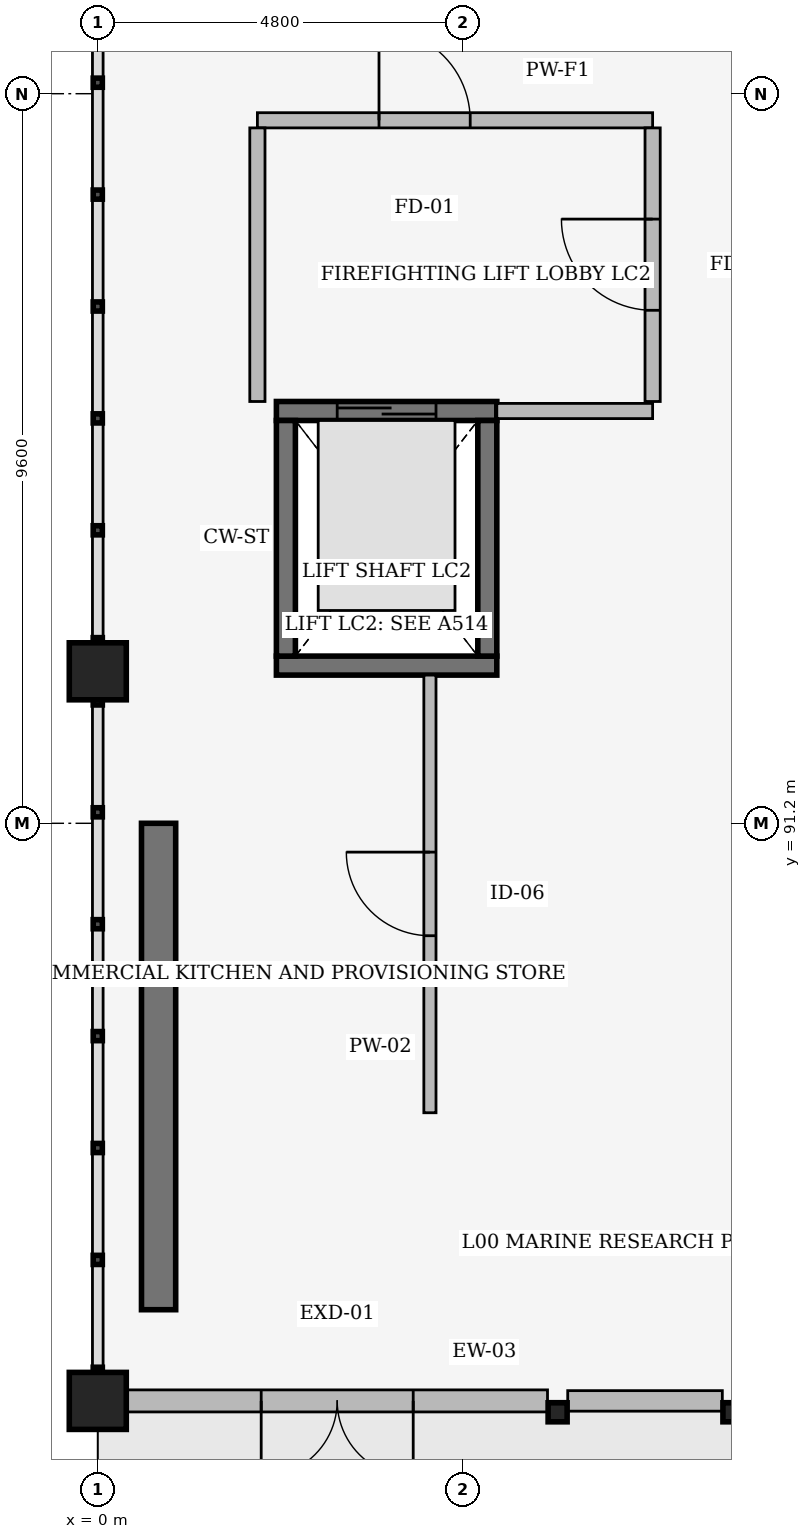
"""IFC4 building model, lengths in metres.
Left out: names, types, materials, properties, quantities, classifications, styles, units other than length and angle.
Written with IfcOpenShell. Run it as: python <this file> out.ifc"""

import sys

from ifc_helpers import new_model, si_unit, direction, frame, frame_2d, origin, origin_2d, place, context, subcontext, project, spatial, rectangle, hollow_rectangle, extrude, element, fill, save


model = new_model("IFC4")
c1 = context("Model", 3, precision=1e-05, world=origin(), true_north=direction((0.0, 1.0)))
c2 = subcontext(c1, "Body", "Model", "MODEL_VIEW")
j1 = project(units=[si_unit("LENGTHUNIT", "METRE"), si_unit("PLANEANGLEUNIT", "RADIAN")], contexts=[c1])
p1 = place(None, origin())
s1 = spatial("IfcSite", under=j1, at=p1, CompositionType="ELEMENT")
p2 = place(p1, origin())
s2 = spatial("IfcBuilding", under=s1, at=p2, CompositionType="ELEMENT")
p3 = place(p2, origin())
s3 = spatial("IfcBuildingStorey", under=s2, at=p3, CompositionType="ELEMENT", Elevation=0.0)
for number, where, z_axis, x_axis in (
    (1, (0.0, 83.6, 0.0), (0.0, 0.0, 1.0), (1.0, 0.0, 0.0)),
    (2, (0.0, 93.2, 0.0), (0.0, 0.0, 1.0), (1.0, 0.0, 0.0)),
):
    element("IfcColumn", number, at=place(p3, frame(where, z_axis=z_axis, x_axis=x_axis)), inside=s3, PredefinedType="COLUMN", context=c2, shape_type="SweptSolid", body=[
        extrude(rectangle(XDim=0.75, YDim=0.75, at=origin_2d()), origin(), (0.0, 0.0, 1.0), 5.4),
    ])
for number, where, z_axis, x_axis in (
    (3, (6.05, 83.45, 0.0), (0.0, 0.0, 1.0), (1.0, 0.0, 0.0)),
    (4, (8.35, 83.45, 0.0), (0.0, 0.0, 1.0), (1.0, 0.0, 0.0)),
):
    element("IfcColumn", number, at=place(p3, frame(where, z_axis=z_axis, x_axis=x_axis)), inside=s3, PredefinedType="COLUMN", context=c2, shape_type="SweptSolid", body=[
        extrude(hollow_rectangle(XDim=0.25, YDim=0.25, WallThickness=0.012, InnerFilletRadius=0.012, OuterFilletRadius=0.025, at=origin_2d()), origin(), (0.0, 0.0, 1.0), 5.4),
    ])
p4 = place(p3, frame((0.8, 84.8, 0.0), z_axis=(0.0, 0.0, 1.0), x_axis=(0.0, 1.0, 0.0)))
e5 = element("IfcWall", 5, at=p4, inside=s3, PredefinedType="SHEAR", context=c2, shape_type="SweptSolid", body=[
    extrude(rectangle(XDim=6.4, YDim=0.45, at=frame_2d((3.2, 0.0))), origin(), (0.0, 0.0, 1.0), 5.4),
])
p5 = place(p3, frame((0.383, 83.6, 0.0), z_axis=(0.0, 0.0, 1.0), x_axis=(1.0, 0.0, 0.0)))
e6 = element("IfcWall", 6, at=p5, inside=s3, PredefinedType="SOLIDWALL", context=c2, shape_type="SweptSolid", body=[
    extrude(rectangle(XDim=5.534, YDim=0.29, at=frame_2d((2.767, 0.0))), origin(), (0.0, 0.0, 1.0), 4.863),
])
p6 = place(p5, frame((3.767, 0.0, 0.0), z_axis=(0.0, 0.0, 1.0), x_axis=(-1.0, 0.0, 0.0)))
e7 = element("IfcOpeningElement", 7, at=p6, cuts=e6, PredefinedType="OPENING", context=c2, shape_type="SweptSolid", body=[
    extrude(rectangle(XDim=2.0, YDim=2.5, at=frame_2d((1.0, 1.25))), frame((0.0, 0.155, 0.0), z_axis=(0.0, -1.0, 0.0), x_axis=(1.0, 0.0, 0.0)), (0.0, 0.0, 1.0), 0.31),
])
p7 = place(p3, frame((6.183, 83.6, 0.0), z_axis=(0.0, 0.0, 1.0), x_axis=(1.0, 0.0, 0.0)))
e8 = element("IfcWall", 8, at=p7, inside=s3, PredefinedType="SOLIDWALL", context=c2, shape_type="SweptSolid", body=[
    extrude(rectangle(XDim=2.034, YDim=0.27, at=frame_2d((1.017, 0.0))), origin(), (0.0, 0.0, 1.0), 4.863),
])
p8 = place(p3, frame((2.35, 93.275, 0.0), z_axis=(0.0, 0.0, 1.0), x_axis=(1.0, 0.0, 0.0)))
e9 = element("IfcWall", 9, at=p8, inside=s3, PredefinedType="SHEAR", context=c2, shape_type="SweptSolid", body=[
    extrude(rectangle(XDim=2.9, YDim=0.25, at=frame_2d((1.45, 0.0))), origin(), (0.0, 0.0, 1.0), 5.1),
])
p9 = place(p3, frame((2.35, 96.625, 0.0), z_axis=(0.0, 0.0, 1.0), x_axis=(1.0, 0.0, 0.0)))
e10 = element("IfcWall", 10, at=p9, inside=s3, PredefinedType="SHEAR", context=c2, shape_type="SweptSolid", body=[
    extrude(rectangle(XDim=2.9, YDim=0.25, at=frame_2d((1.45, 0.0))), origin(), (0.0, 0.0, 1.0), 5.1),
])
p10 = place(p9, frame((0.8, 0.0, 0.0)))
e11 = element("IfcOpeningElement", 11, at=p10, cuts=e10, PredefinedType="OPENING", context=c2, shape_type="SweptSolid", body=[
    extrude(rectangle(XDim=1.3, YDim=2.2, at=frame_2d((0.65, 1.1))), frame((0.0, 0.135, 0.0), z_axis=(0.0, -1.0, 0.0), x_axis=(1.0, 0.0, 0.0)), (0.0, 0.0, 1.0), 0.27),
])
for number, where, z_axis, x_axis in (
    (12, (2.475, 93.4, 0.0), (0.0, 0.0, 1.0), (0.0, 1.0, 0.0)),
    (13, (5.125, 93.4, 0.0), (0.0, 0.0, 1.0), (0.0, 1.0, 0.0)),
):
    element("IfcWall", number, at=place(p3, frame(where, z_axis=z_axis, x_axis=x_axis)), inside=s3, PredefinedType="SHEAR", context=c2, shape_type="SweptSolid", body=[
        extrude(rectangle(XDim=3.1, YDim=0.25, at=frame_2d((1.55, 0.0))), origin(), (0.0, 0.0, 1.0), 5.1),
    ])
p11 = place(p3, frame((2.1, 100.45, 0.0), z_axis=(0.0, 0.0, 1.0), x_axis=(1.0, 0.0, 0.0)))
e14 = element("IfcWall", 14, at=p11, inside=s3, PredefinedType="PARTITIONING", context=c2, shape_type="SweptSolid", body=[
    extrude(rectangle(XDim=5.2, YDim=0.2, at=frame_2d((2.6, 0.0))), origin(), (0.0, 0.0, 1.0), 4.814),
])
p12 = place(p11, frame((1.6, 0.0, 0.0)))
e15 = element("IfcOpeningElement", 15, at=p12, cuts=e14, PredefinedType="OPENING", context=c2, shape_type="SweptSolid", body=[
    extrude(rectangle(XDim=1.2, YDim=2.2, at=frame_2d((0.6, 1.1))), frame((0.0, 0.11, 0.0), z_axis=(0.0, -1.0, 0.0), x_axis=(1.0, 0.0, 0.0)), (0.0, 0.0, 1.0), 0.22),
])
p13 = place(p3, frame((2.1, 96.75, 0.0), z_axis=(0.0, 0.0, 1.0), x_axis=(0.0, 1.0, 0.0)))
e16 = element("IfcWall", 16, at=p13, inside=s3, PredefinedType="PARTITIONING", context=c2, shape_type="SweptSolid", body=[
    extrude(rectangle(XDim=3.6, YDim=0.2, at=frame_2d((1.8, 0.0))), origin(), (0.0, 0.0, 1.0), 4.756),
])
p14 = place(p3, frame((7.3, 96.75, 0.0), z_axis=(0.0, 0.0, 1.0), x_axis=(0.0, 1.0, 0.0)))
e17 = element("IfcWall", 17, at=p14, inside=s3, PredefinedType="PARTITIONING", context=c2, shape_type="SweptSolid", body=[
    extrude(rectangle(XDim=3.6, YDim=0.2, at=frame_2d((1.8, 0.0))), origin(), (0.0, 0.0, 1.0), 4.756),
])
p15 = place(p14, frame((1.2, 0.0, 0.0)))
e18 = element("IfcOpeningElement", 18, at=p15, cuts=e17, PredefinedType="OPENING", context=c2, shape_type="SweptSolid", body=[
    extrude(rectangle(XDim=1.2, YDim=2.2, at=frame_2d((0.6, 1.1))), frame((0.0, 0.11, 0.0), z_axis=(0.0, -1.0, 0.0), x_axis=(1.0, 0.0, 0.0)), (0.0, 0.0, 1.0), 0.22),
])
p16 = place(p3, frame((5.25, 96.625, 0.0), z_axis=(0.0, 0.0, 1.0), x_axis=(1.0, 0.0, 0.0)))
e19 = element("IfcWall", 19, at=p16, inside=s3, PredefinedType="PARTITIONING", context=c2, shape_type="SweptSolid", body=[
    extrude(rectangle(XDim=2.05, YDim=0.2, at=frame_2d((1.025, 0.0))), origin(), (0.0, 0.0, 1.0), 5.04),
])
p17 = place(p3, frame((4.37, 87.392, 0.0), z_axis=(0.0, 0.0, 1.0), x_axis=(0.0, 1.0, 0.0)))
e20 = element("IfcWall", 20, at=p17, inside=s3, PredefinedType="PARTITIONING", context=c2, shape_type="SweptSolid", body=[
    extrude(rectangle(XDim=5.758, YDim=0.16, at=frame_2d((2.879, 0.0))), origin(), (0.0, 0.0, 1.0), 4.522),
])
p18 = place(p17, frame((2.329, 0.0, 0.0)))
e21 = element("IfcOpeningElement", 21, at=p18, cuts=e20, PredefinedType="OPENING", context=c2, shape_type="SweptSolid", body=[
    extrude(rectangle(XDim=1.1, YDim=2.2, at=frame_2d((0.55, 1.1))), frame((0.0, 0.09, 0.0), z_axis=(0.0, -1.0, 0.0), x_axis=(1.0, 0.0, 0.0)), (0.0, 0.0, 1.0), 0.18),
])
p19 = place(p6, origin())
e22 = element("IfcDoor", 22, at=p19, inside=s3, OperationType="DOUBLE_DOOR_SINGLE_SWING", PredefinedType="DOOR", context=c2, shape_type="SweptSolid", body=[
    extrude(rectangle(XDim=2.0, YDim=2.5, at=frame_2d((1.0, 1.25))), frame((0.0, 0.025, 0.0), z_axis=(0.0, -1.0, 0.0), x_axis=(1.0, 0.0, 0.0)), (0.0, 0.0, 1.0), 0.05),
])
fill(e7, e22)
p20 = place(p10, origin())
e23 = element("IfcDoor", 23, at=p20, inside=s3, OperationType="DOUBLE_DOOR_SLIDING", PredefinedType="DOOR", context=c2, shape_type="SweptSolid", body=[
    extrude(rectangle(XDim=1.3, YDim=2.2, at=frame_2d((0.65, 1.1))), frame((0.0, 0.025, 0.0), z_axis=(0.0, -1.0, 0.0), x_axis=(1.0, 0.0, 0.0)), (0.0, 0.0, 1.0), 0.05),
])
fill(e11, e23)
p21 = place(p15, origin())
e24 = element("IfcDoor", 24, at=p21, inside=s3, OperationType="SINGLE_SWING_RIGHT", PredefinedType="DOOR", context=c2, shape_type="SweptSolid", body=[
    extrude(rectangle(XDim=1.2, YDim=2.2, at=frame_2d((0.6, 1.1))), frame((0.0, 0.025, 0.0), z_axis=(0.0, -1.0, 0.0), x_axis=(1.0, 0.0, 0.0)), (0.0, 0.0, 1.0), 0.05),
])
fill(e18, e24)
p22 = place(p12, origin())
e25 = element("IfcDoor", 25, at=p22, inside=s3, OperationType="SINGLE_SWING_LEFT", PredefinedType="DOOR", context=c2, shape_type="SweptSolid", body=[
    extrude(rectangle(XDim=1.2, YDim=2.2, at=frame_2d((0.6, 1.1))), frame((0.0, 0.025, 0.0), z_axis=(0.0, -1.0, 0.0), x_axis=(1.0, 0.0, 0.0)), (0.0, 0.0, 1.0), 0.05),
])
fill(e15, e25)
p23 = place(p18, origin())
e26 = element("IfcDoor", 26, at=p23, inside=s3, OperationType="SINGLE_SWING_RIGHT", PredefinedType="DOOR", context=c2, shape_type="SweptSolid", body=[
    extrude(rectangle(XDim=1.1, YDim=2.2, at=frame_2d((0.55, 1.1))), frame((0.0, 0.025, 0.0), z_axis=(0.0, -1.0, 0.0), x_axis=(1.0, 0.0, 0.0)), (0.0, 0.0, 1.0), 0.05),
])
fill(e21, e26)
save(model, sys.argv[1])
